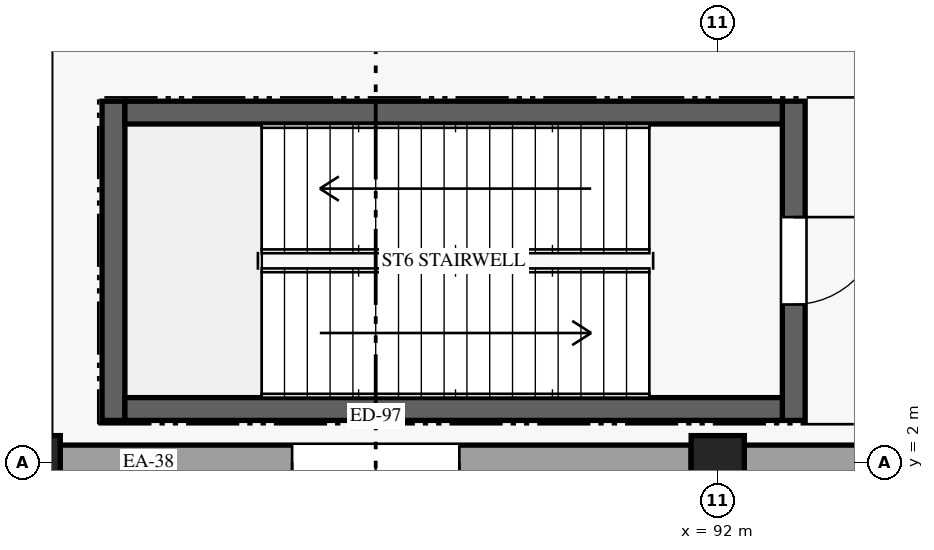
"""IFC4 building model, lengths in metres.
Left out: names, types, materials, properties, quantities, classifications, styles, units other than length and angle.
Written with IfcOpenShell. Run it as: python <this file> out.ifc"""

import sys

from ifc_helpers import new_model, si_unit, direction, frame, frame_2d, origin, origin_2d, place, context, subcontext, project, spatial, rectangle, extrude, element, fill, save


model = new_model("IFC4")
c1 = context("Model", 3, precision=1e-05, world=origin(), true_north=direction((0.0, 1.0)))
c2 = subcontext(c1, "Body", "Model", "MODEL_VIEW")
j1 = project(units=[si_unit("LENGTHUNIT", "METRE"), si_unit("PLANEANGLEUNIT", "RADIAN")], contexts=[c1])
p1 = place(None, origin())
s1 = spatial("IfcSite", under=j1, at=p1, CompositionType="ELEMENT")
p2 = place(p1, origin())
s2 = spatial("IfcBuilding", under=s1, at=p2, CompositionType="ELEMENT")
p3 = place(p2, origin())
s3 = spatial("IfcBuildingStorey", under=s2, at=p3, CompositionType="ELEMENT", Elevation=0.0)
for number, where, z_axis, x_axis in (
    (1, (83.0, 2.0, 0.0), (0.0, 0.0, 1.0), (1.0, 0.0, 0.0)),
    (2, (92.0, 2.0, 0.0), (0.0, 0.0, 1.0), (1.0, 0.0, 0.0)),
):
    element("IfcColumn", number, at=place(p3, frame(where, z_axis=z_axis, x_axis=x_axis)), inside=s3, PredefinedType="COLUMN", context=c2, shape_type="SweptSolid", body=[
        extrude(rectangle(XDim=0.7, YDim=0.7, at=origin_2d()), origin(), (0.0, 0.0, 1.0), 5.4),
    ])
p4 = place(p3, frame((83.35, 2.0, 0.0), z_axis=(0.0, 0.0, 1.0), x_axis=(1.0, 0.0, 0.0)))
e3 = element("IfcWall", 3, at=p4, inside=s3, PredefinedType="STANDARD", context=c2, shape_type="SweptSolid", body=[
    extrude(rectangle(XDim=8.3, YDim=0.45, at=frame_2d((4.15, 0.0))), origin(), (0.0, 0.0, 1.0), 4.195),
])
p5 = place(p4, frame((5.25, 0.0, 0.0), z_axis=(0.0, 0.0, 1.0), x_axis=(-1.0, 0.0, 0.0)))
e4 = element("IfcOpeningElement", 4, at=p5, cuts=e3, PredefinedType="OPENING", context=c2, shape_type="SweptSolid", body=[
    extrude(rectangle(XDim=2.2, YDim=2.5, at=frame_2d((1.1, 1.25))), frame((0.0, 0.235, 0.0), z_axis=(0.0, -1.0, 0.0), x_axis=(1.0, 0.0, 0.0)), (0.0, 0.0, 1.0), 0.47),
])
p6 = place(p3, frame((92.35, 2.0, 0.0), z_axis=(0.0, 0.0, 1.0), x_axis=(1.0, 0.0, 0.0)))
e5 = element("IfcWall", 5, at=p6, inside=s3, PredefinedType="STANDARD", context=c2, shape_type="SweptSolid", body=[
    extrude(rectangle(XDim=8.3, YDim=0.45, at=frame_2d((4.15, 0.0))), origin(), (0.0, 0.0, 1.0), 3.545),
])
p7 = place(p6, frame((5.175, 0.0, 0.0), z_axis=(0.0, 0.0, 1.0), x_axis=(-1.0, 0.0, 0.0)))
e6 = element("IfcOpeningElement", 6, at=p7, cuts=e5, PredefinedType="OPENING", context=c2, shape_type="SweptSolid", body=[
    extrude(rectangle(XDim=2.05, YDim=2.45, at=frame_2d((1.025, 1.225))), frame((0.0, 0.235, 0.0), z_axis=(0.0, -1.0, 0.0), x_axis=(1.0, 0.0, 0.0)), (0.0, 0.0, 1.0), 0.47),
])
p8 = place(p3, frame((93.0, 2.55, 0.0), z_axis=(0.0, 0.0, 1.0), x_axis=(0.0, 1.0, 0.0)))
e7 = element("IfcWall", 7, at=p8, inside=s3, PredefinedType="SHEAR", context=c2, shape_type="SweptSolid", body=[
    extrude(rectangle(XDim=4.2, YDim=0.3, at=frame_2d((2.1, 0.0))), origin(), (0.0, 0.0, 1.0), 5.06),
])
p9 = place(p8, frame((2.675, 0.0, 0.0), z_axis=(0.0, 0.0, 1.0), x_axis=(-1.0, 0.0, 0.0)))
e8 = element("IfcOpeningElement", 8, at=p9, cuts=e7, PredefinedType="OPENING", context=c2, shape_type="SweptSolid", body=[
    extrude(rectangle(XDim=1.15, YDim=2.2, at=frame_2d((0.575, 1.1))), frame((0.0, 0.16, 0.0), z_axis=(0.0, -1.0, 0.0), x_axis=(1.0, 0.0, 0.0)), (0.0, 0.0, 1.0), 0.32),
])
p10 = place(p3, frame((84.05, 2.55, 0.0), z_axis=(0.0, 0.0, 1.0), x_axis=(0.0, 1.0, 0.0)))
e9 = element("IfcWall", 9, at=p10, inside=s3, PredefinedType="SHEAR", context=c2, shape_type="SweptSolid", body=[
    extrude(rectangle(XDim=4.2, YDim=0.3, at=frame_2d((2.1, 0.0))), origin(), (0.0, 0.0, 1.0), 5.06),
])
for number, where, z_axis, x_axis in (
    (10, (84.2, 2.7, 0.0), (0.0, 0.0, 1.0), (1.0, 0.0, 0.0)),
    (11, (84.2, 6.6, 0.0), (0.0, 0.0, 1.0), (1.0, 0.0, 0.0)),
):
    element("IfcWall", number, at=place(p3, frame(where, z_axis=z_axis, x_axis=x_axis)), inside=s3, PredefinedType="SHEAR", context=c2, shape_type="SweptSolid", body=[
        extrude(rectangle(XDim=8.65, YDim=0.3, at=frame_2d((4.325, 0.0))), origin(), (0.0, 0.0, 1.0), 5.06),
    ])
p11 = place(p5, origin())
e12 = element("IfcDoor", 12, at=p11, inside=s3, OperationType="DOUBLE_DOOR_SINGLE_SWING", PredefinedType="DOOR", context=c2, shape_type="SweptSolid", body=[
    extrude(rectangle(XDim=2.2, YDim=2.5, at=frame_2d((1.1, 1.25))), frame((0.0, 0.025, 0.0), z_axis=(0.0, -1.0, 0.0), x_axis=(1.0, 0.0, 0.0)), (0.0, 0.0, 1.0), 0.05),
])
fill(e4, e12)
p12 = place(p9, origin())
e13 = element("IfcDoor", 13, at=p12, inside=s3, OperationType="SINGLE_SWING_LEFT", PredefinedType="DOOR", context=c2, shape_type="SweptSolid", body=[
    extrude(rectangle(XDim=1.15, YDim=2.2, at=frame_2d((0.575, 1.1))), frame((0.0, 0.025, 0.0), z_axis=(0.0, -1.0, 0.0), x_axis=(1.0, 0.0, 0.0)), (0.0, 0.0, 1.0), 0.05),
])
fill(e8, e13)
save(model, sys.argv[1])
